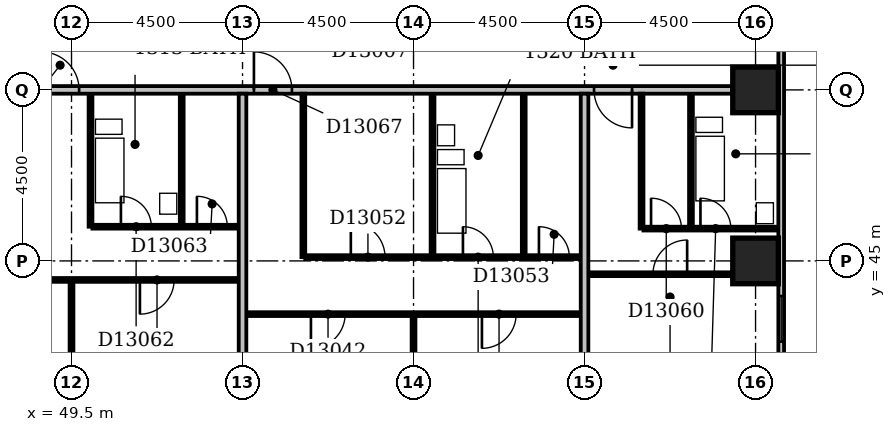
"""IFC4 building model, lengths in metres.
Left out: names, types, materials, properties, quantities, classifications, styles, units other than length and angle.
Written with IfcOpenShell. Run it as: python <this file> out.ifc"""

import sys

from ifc_helpers import new_model, si_unit, direction, frame, frame_2d, origin, origin_2d, place, context, subcontext, project, spatial, rectangle, extrude, element, fill, save


model = new_model("IFC4")
c1 = context("Model", 3, precision=1e-05, world=origin(), true_north=direction((0.0, 1.0)))
c2 = subcontext(c1, "Body", "Model", "MODEL_VIEW")
j1 = project(units=[si_unit("LENGTHUNIT", "METRE"), si_unit("PLANEANGLEUNIT", "RADIAN")], contexts=[c1])
p1 = place(None, origin())
s1 = spatial("IfcSite", under=j1, at=p1, CompositionType="ELEMENT")
p2 = place(p1, origin())
s2 = spatial("IfcBuilding", under=s1, at=p2, CompositionType="ELEMENT")
p3 = place(p2, frame((0.0, 0.0, 57.8)))
s3 = spatial("IfcBuildingStorey", under=s2, at=p3, CompositionType="ELEMENT", Elevation=57.8)
for number, where, z_axis, x_axis in (
    (1, (67.5, 45.0, -0.3), (0.0, 0.0, 1.0), (1.0, 0.0, 0.0)),
    (2, (67.5, 49.5, -0.3), (0.0, 0.0, 1.0), (1.0, 0.0, 0.0)),
):
    element("IfcColumn", number, at=place(p3, frame(where, z_axis=z_axis, x_axis=x_axis)), inside=s3, PredefinedType="COLUMN", context=c2, shape_type="SweptSolid", body=[
        extrude(rectangle(XDim=1.2, YDim=1.2, at=origin_2d()), origin(), (0.0, 0.0, 1.0), 3.6),
    ])
p4 = place(p3, frame((68.175, 35.4, 0.0), z_axis=(0.0, 0.0, 1.0), x_axis=(0.0, 1.0, 0.0)))
e3 = element("IfcWall", 3, at=p4, inside=s3, PredefinedType="STANDARD", context=c2, shape_type="SweptSolid", body=[
    extrude(rectangle(XDim=23.85, YDim=0.15, at=frame_2d((11.925, 0.0))), origin(), (0.0, 0.0, 1.0), 2.7),
])
p5 = place(p4, frame((1.65, 0.0, 0.6)))
e4 = element("IfcOpeningElement", 4, at=p5, cuts=e3, PredefinedType="OPENING", context=c2, shape_type="SweptSolid", body=[
    extrude(rectangle(XDim=2.4, YDim=1.8, at=frame_2d((1.2, 0.9))), frame((0.0, 0.087, 0.0), z_axis=(0.0, -1.0, 0.0), x_axis=(1.0, 0.0, 0.0)), (0.0, 0.0, 1.0), 0.174),
])
p6 = place(p4, frame((7.477, 0.0, 0.6)))
e5 = element("IfcOpeningElement", 5, at=p6, cuts=e3, PredefinedType="OPENING", context=c2, shape_type="SweptSolid", body=[
    extrude(rectangle(XDim=1.2, YDim=1.8, at=frame_2d((0.6, 0.9))), frame((0.0, 0.087, 0.0), z_axis=(0.0, -1.0, 0.0), x_axis=(1.0, 0.0, 0.0)), (0.0, 0.0, 1.0), 0.174),
])
p7 = place(p3, frame((49.5, 36.6, 0.0), z_axis=(0.0, 0.0, 1.0), x_axis=(0.0, 1.0, 0.0)))
e6 = element("IfcWall", 6, at=p7, inside=s3, PredefinedType="PARTITIONING", context=c2, shape_type="SweptSolid", body=[
    extrude(rectangle(XDim=7.85, YDim=0.1, at=frame_2d((3.925, 0.0))), origin(), (0.0, 0.0, 1.0), 3.3),
])
p8 = place(p3, frame((54.0, 36.6, 0.0), z_axis=(0.0, 0.0, 1.0), x_axis=(0.0, 1.0, 0.0)))
e7 = element("IfcWall", 7, at=p8, inside=s3, PredefinedType="PARTITIONING", context=c2, shape_type="SweptSolid", body=[
    extrude(rectangle(XDim=12.8, YDim=0.2, at=frame_2d((6.4, 0.0))), origin(), (0.0, 0.0, 1.0), 2.6),
])
p9 = place(p3, frame((58.5, 36.6, 0.0), z_axis=(0.0, 0.0, 1.0), x_axis=(0.0, 1.0, 0.0)))
e8 = element("IfcWall", 8, at=p9, inside=s3, PredefinedType="PARTITIONING", context=c2, shape_type="SweptSolid", body=[
    extrude(rectangle(XDim=6.95, YDim=0.1, at=frame_2d((3.475, 0.0))), origin(), (0.0, 0.0, 1.0), 3.3),
])
p10 = place(p3, frame((63.0, 36.6, 0.0), z_axis=(0.0, 0.0, 1.0), x_axis=(0.0, 1.0, 0.0)))
e9 = element("IfcWall", 9, at=p10, inside=s3, PredefinedType="PARTITIONING", context=c2, shape_type="SweptSolid", body=[
    extrude(rectangle(XDim=12.8, YDim=0.2, at=frame_2d((6.4, 0.0))), origin(), (0.0, 0.0, 1.0), 2.4),
])
p11 = place(p3, frame((54.1, 43.6, 0.0), z_axis=(0.0, 0.0, 1.0), x_axis=(1.0, 0.0, 0.0)))
e10 = element("IfcWall", 10, at=p11, inside=s3, PredefinedType="PARTITIONING", context=c2, shape_type="SweptSolid", body=[
    extrude(rectangle(XDim=8.8, YDim=0.1, at=frame_2d((4.4, 0.0))), origin(), (0.0, 0.0, 1.0), 3.3),
])
p12 = place(p11, frame((1.7, 0.0, 0.0)))
e11 = element("IfcOpeningElement", 11, at=p12, cuts=e10, PredefinedType="OPENING", context=c2, shape_type="SweptSolid", body=[
    extrude(rectangle(XDim=0.9, YDim=2.1, at=frame_2d((0.45, 1.05))), frame((0.0, 0.062, 0.0), z_axis=(0.0, -1.0, 0.0), x_axis=(1.0, 0.0, 0.0)), (0.0, 0.0, 1.0), 0.124),
])
p13 = place(p11, frame((6.2, 0.0, 0.0)))
e12 = element("IfcOpeningElement", 12, at=p13, cuts=e10, PredefinedType="OPENING", context=c2, shape_type="SweptSolid", body=[
    extrude(rectangle(XDim=0.9, YDim=2.1, at=frame_2d((0.45, 1.05))), frame((0.0, 0.062, 0.0), z_axis=(0.0, -1.0, 0.0), x_axis=(1.0, 0.0, 0.0)), (0.0, 0.0, 1.0), 0.124),
])
p14 = place(p3, frame((40.6, 44.5, 0.0), z_axis=(0.0, 0.0, 1.0), x_axis=(1.0, 0.0, 0.0)))
e13 = element("IfcWall", 13, at=p14, inside=s3, PredefinedType="PARTITIONING", context=c2, shape_type="SweptSolid", body=[
    extrude(rectangle(XDim=13.3, YDim=0.1, at=frame_2d((6.65, 0.0))), origin(), (0.0, 0.0, 1.0), 3.3),
])
p15 = place(p14, frame((1.7, 0.0, 0.0)))
e14 = element("IfcOpeningElement", 14, at=p15, cuts=e13, PredefinedType="OPENING", context=c2, shape_type="SweptSolid", body=[
    extrude(rectangle(XDim=0.9, YDim=2.1, at=frame_2d((0.45, 1.05))), frame((0.0, 0.062, 0.0), z_axis=(0.0, -1.0, 0.0), x_axis=(1.0, 0.0, 0.0)), (0.0, 0.0, 1.0), 0.124),
])
p16 = place(p14, frame((6.2, 0.0, 0.0)))
e15 = element("IfcOpeningElement", 15, at=p16, cuts=e13, PredefinedType="OPENING", context=c2, shape_type="SweptSolid", body=[
    extrude(rectangle(XDim=0.9, YDim=2.1, at=frame_2d((0.45, 1.05))), frame((0.0, 0.062, 0.0), z_axis=(0.0, -1.0, 0.0), x_axis=(1.0, 0.0, 0.0)), (0.0, 0.0, 1.0), 0.124),
])
p17 = place(p14, frame((10.7, 0.0, 0.0)))
e16 = element("IfcOpeningElement", 16, at=p17, cuts=e13, PredefinedType="OPENING", context=c2, shape_type="SweptSolid", body=[
    extrude(rectangle(XDim=0.9, YDim=2.1, at=frame_2d((0.45, 1.05))), frame((0.0, 0.062, 0.0), z_axis=(0.0, -1.0, 0.0), x_axis=(1.0, 0.0, 0.0)), (0.0, 0.0, 1.0), 0.124),
])
p18 = place(p3, frame((63.1, 44.65, 0.0), z_axis=(0.0, 0.0, 1.0), x_axis=(1.0, 0.0, 0.0)))
e17 = element("IfcWall", 17, at=p18, inside=s3, PredefinedType="PARTITIONING", context=c2, shape_type="SweptSolid", body=[
    extrude(rectangle(XDim=3.8, YDim=0.1, at=frame_2d((1.9, 0.0))), origin(), (0.0, 0.0, 1.0), 3.3),
])
p19 = place(p18, frame((1.7, 0.0, 0.0)))
e18 = element("IfcOpeningElement", 18, at=p19, cuts=e17, PredefinedType="OPENING", context=c2, shape_type="SweptSolid", body=[
    extrude(rectangle(XDim=0.9, YDim=2.1, at=frame_2d((0.45, 1.05))), frame((0.0, 0.062, 0.0), z_axis=(0.0, -1.0, 0.0), x_axis=(1.0, 0.0, 0.0)), (0.0, 0.0, 1.0), 0.124),
])
p20 = place(p3, frame((55.6, 45.1, 0.0), z_axis=(0.0, 0.0, 1.0), x_axis=(0.0, 1.0, 0.0)))
e19 = element("IfcWall", 19, at=p20, inside=s3, PredefinedType="PARTITIONING", context=c2, shape_type="SweptSolid", body=[
    extrude(rectangle(XDim=4.3, YDim=0.1, at=frame_2d((2.15, 0.0))), origin(), (0.0, 0.0, 1.0), 3.3),
])
p21 = place(p3, frame((55.65, 45.1, 0.0), z_axis=(0.0, 0.0, 1.0), x_axis=(1.0, 0.0, 0.0)))
e20 = element("IfcWall", 20, at=p21, inside=s3, PredefinedType="PARTITIONING", context=c2, shape_type="SweptSolid", body=[
    extrude(rectangle(XDim=7.25, YDim=0.1, at=frame_2d((3.625, 0.0))), origin(), (0.0, 0.0, 1.0), 3.3),
])
p22 = place(p21, frame((4.15, 0.0, 0.0)))
e21 = element("IfcOpeningElement", 21, at=p22, cuts=e20, PredefinedType="OPENING", context=c2, shape_type="SweptSolid", body=[
    extrude(rectangle(XDim=0.8, YDim=2.1, at=frame_2d((0.4, 1.05))), frame((0.0, 0.062, 0.0), z_axis=(0.0, -1.0, 0.0), x_axis=(1.0, 0.0, 0.0)), (0.0, 0.0, 1.0), 0.124),
])
p23 = place(p21, frame((1.2, 0.0, 0.0)))
e22 = element("IfcOpeningElement", 22, at=p23, cuts=e20, PredefinedType="OPENING", context=c2, shape_type="SweptSolid", body=[
    extrude(rectangle(XDim=0.9, YDim=2.1, at=frame_2d((0.45, 1.05))), frame((0.0, 0.062, 0.0), z_axis=(0.0, -1.0, 0.0), x_axis=(1.0, 0.0, 0.0)), (0.0, 0.0, 1.0), 0.124),
])
p24 = place(p21, frame((6.15, 0.0, 0.0)))
e23 = element("IfcOpeningElement", 23, at=p24, cuts=e20, PredefinedType="OPENING", context=c2, shape_type="SweptSolid", body=[
    extrude(rectangle(XDim=0.8, YDim=2.1, at=frame_2d((0.4, 1.05))), frame((0.0, 0.062, 0.0), z_axis=(0.0, -1.0, 0.0), x_axis=(1.0, 0.0, 0.0)), (0.0, 0.0, 1.0), 0.124),
])
for number, where, z_axis, x_axis in (
    (24, (59.0, 45.15, 0.0), (0.0, 0.0, 1.0), (0.0, 1.0, 0.0)),
    (25, (61.4, 45.15, 0.0), (0.0, 0.0, 1.0), (0.0, 1.0, 0.0)),
):
    element("IfcWall", number, at=place(p3, frame(where, z_axis=z_axis, x_axis=x_axis)), inside=s3, PredefinedType="PLUMBINGWALL", context=c2, shape_type="SweptSolid", body=[
        extrude(rectangle(XDim=4.25, YDim=0.1, at=frame_2d((2.125, 0.0))), origin(), (0.0, 0.0, 1.0), 3.3),
    ])
p25 = place(p3, frame((64.5, 45.85, 0.0), z_axis=(0.0, 0.0, 1.0), x_axis=(0.0, 1.0, 0.0)))
e26 = element("IfcWall", 26, at=p25, inside=s3, PredefinedType="PARTITIONING", context=c2, shape_type="SweptSolid", body=[
    extrude(rectangle(XDim=3.55, YDim=0.1, at=frame_2d((1.775, 0.0))), origin(), (0.0, 0.0, 1.0), 3.3),
])
p26 = place(p3, frame((64.55, 45.85, 0.0), z_axis=(0.0, 0.0, 1.0), x_axis=(1.0, 0.0, 0.0)))
e27 = element("IfcWall", 27, at=p26, inside=s3, PredefinedType="PARTITIONING", context=c2, shape_type="SweptSolid", body=[
    extrude(rectangle(XDim=3.55, YDim=0.1, at=frame_2d((1.775, 0.0))), origin(), (0.0, 0.0, 1.0), 3.3),
])
p27 = place(p26, frame((1.5, 0.0, 0.0)))
e28 = element("IfcOpeningElement", 28, at=p27, cuts=e27, PredefinedType="OPENING", context=c2, shape_type="SweptSolid", body=[
    extrude(rectangle(XDim=0.8, YDim=2.1, at=frame_2d((0.4, 1.05))), frame((0.0, 0.062, 0.0), z_axis=(0.0, -1.0, 0.0), x_axis=(1.0, 0.0, 0.0)), (0.0, 0.0, 1.0), 0.124),
])
p28 = place(p26, frame((0.2, 0.0, 0.0)))
e29 = element("IfcOpeningElement", 29, at=p28, cuts=e27, PredefinedType="OPENING", context=c2, shape_type="SweptSolid", body=[
    extrude(rectangle(XDim=0.8, YDim=2.1, at=frame_2d((0.4, 1.05))), frame((0.0, 0.062, 0.0), z_axis=(0.0, -1.0, 0.0), x_axis=(1.0, 0.0, 0.0)), (0.0, 0.0, 1.0), 0.124),
])
p29 = place(p3, frame((50.0, 45.9, 0.0), z_axis=(0.0, 0.0, 1.0), x_axis=(0.0, 1.0, 0.0)))
e30 = element("IfcWall", 30, at=p29, inside=s3, PredefinedType="PLUMBINGWALL", context=c2, shape_type="SweptSolid", body=[
    extrude(rectangle(XDim=3.5, YDim=0.1, at=frame_2d((1.75, 0.0))), origin(), (0.0, 0.0, 1.0), 3.3),
])
p30 = place(p3, frame((50.05, 45.9, 0.0), z_axis=(0.0, 0.0, 1.0), x_axis=(1.0, 0.0, 0.0)))
e31 = element("IfcWall", 31, at=p30, inside=s3, PredefinedType="PARTITIONING", context=c2, shape_type="SweptSolid", body=[
    extrude(rectangle(XDim=3.85, YDim=0.1, at=frame_2d((1.925, 0.0))), origin(), (0.0, 0.0, 1.0), 3.3),
])
p31 = place(p30, frame((0.75, 0.0, 0.0)))
e32 = element("IfcOpeningElement", 32, at=p31, cuts=e31, PredefinedType="OPENING", context=c2, shape_type="SweptSolid", body=[
    extrude(rectangle(XDim=0.8, YDim=2.1, at=frame_2d((0.4, 1.05))), frame((0.0, 0.062, 0.0), z_axis=(0.0, -1.0, 0.0), x_axis=(1.0, 0.0, 0.0)), (0.0, 0.0, 1.0), 0.124),
])
p32 = place(p30, frame((2.75, 0.0, 0.0)))
e33 = element("IfcOpeningElement", 33, at=p32, cuts=e31, PredefinedType="OPENING", context=c2, shape_type="SweptSolid", body=[
    extrude(rectangle(XDim=0.8, YDim=2.1, at=frame_2d((0.4, 1.05))), frame((0.0, 0.062, 0.0), z_axis=(0.0, -1.0, 0.0), x_axis=(1.0, 0.0, 0.0)), (0.0, 0.0, 1.0), 0.124),
])
p33 = place(p3, frame((65.8, 45.9, 0.0), z_axis=(0.0, 0.0, 1.0), x_axis=(0.0, 1.0, 0.0)))
e34 = element("IfcWall", 34, at=p33, inside=s3, PredefinedType="PLUMBINGWALL", context=c2, shape_type="SweptSolid", body=[
    extrude(rectangle(XDim=3.5, YDim=0.1, at=frame_2d((1.75, 0.0))), origin(), (0.0, 0.0, 1.0), 3.3),
])
p34 = place(p3, frame((52.4, 45.95, 0.0), z_axis=(0.0, 0.0, 1.0), x_axis=(0.0, 1.0, 0.0)))
e35 = element("IfcWall", 35, at=p34, inside=s3, PredefinedType="PLUMBINGWALL", context=c2, shape_type="SweptSolid", body=[
    extrude(rectangle(XDim=3.45, YDim=0.1, at=frame_2d((1.725, 0.0))), origin(), (0.0, 0.0, 1.0), 3.3),
])
p35 = place(p3, frame((9.1, 49.5, 0.0), z_axis=(0.0, 0.0, 1.0), x_axis=(1.0, 0.0, 0.0)))
e36 = element("IfcWall", 36, at=p35, inside=s3, PredefinedType="PARTITIONING", context=c2, shape_type="SweptSolid", body=[
    extrude(rectangle(XDim=57.8, YDim=0.2, at=frame_2d((28.9, 0.0))), origin(), (0.0, 0.0, 1.0), 3.3),
])
p36 = place(p35, frame((15.35, 0.0, 0.0)))
e37 = element("IfcOpeningElement", 37, at=p36, cuts=e36, PredefinedType="OPENING", context=c2, shape_type="SweptSolid", body=[
    extrude(rectangle(XDim=1.0, YDim=2.1, at=frame_2d((0.5, 1.05))), frame((0.0, 0.112, 0.0), z_axis=(0.0, -1.0, 0.0), x_axis=(1.0, 0.0, 0.0)), (0.0, 0.0, 1.0), 0.224),
])
p37 = place(p35, frame((18.2, 0.0, 0.0)))
e38 = element("IfcOpeningElement", 38, at=p37, cuts=e36, PredefinedType="OPENING", context=c2, shape_type="SweptSolid", body=[
    extrude(rectangle(XDim=1.0, YDim=2.1, at=frame_2d((0.5, 1.05))), frame((0.0, 0.112, 0.0), z_axis=(0.0, -1.0, 0.0), x_axis=(1.0, 0.0, 0.0)), (0.0, 0.0, 1.0), 0.224),
])
p38 = place(p35, frame((39.6, 0.0, 0.0)))
e39 = element("IfcOpeningElement", 39, at=p38, cuts=e36, PredefinedType="OPENING", context=c2, shape_type="SweptSolid", body=[
    extrude(rectangle(XDim=1.0, YDim=2.1, at=frame_2d((0.5, 1.05))), frame((0.0, 0.112, 0.0), z_axis=(0.0, -1.0, 0.0), x_axis=(1.0, 0.0, 0.0)), (0.0, 0.0, 1.0), 0.224),
])
p39 = place(p35, frame((45.2, 0.0, 0.0)))
e40 = element("IfcOpeningElement", 40, at=p39, cuts=e36, PredefinedType="OPENING", context=c2, shape_type="SweptSolid", body=[
    extrude(rectangle(XDim=1.0, YDim=2.1, at=frame_2d((0.5, 1.05))), frame((0.0, 0.112, 0.0), z_axis=(0.0, -1.0, 0.0), x_axis=(1.0, 0.0, 0.0)), (0.0, 0.0, 1.0), 0.224),
])
p40 = place(p35, frame((54.15, 0.0, 0.0)))
e41 = element("IfcOpeningElement", 41, at=p40, cuts=e36, PredefinedType="OPENING", context=c2, shape_type="SweptSolid", body=[
    extrude(rectangle(XDim=1.0, YDim=2.1, at=frame_2d((0.5, 1.05))), frame((0.0, 0.112, 0.0), z_axis=(0.0, -1.0, 0.0), x_axis=(1.0, 0.0, 0.0)), (0.0, 0.0, 1.0), 0.224),
])
p41 = place(p35, frame((6.15, 0.0, 0.0)))
e42 = element("IfcOpeningElement", 42, at=p41, cuts=e36, PredefinedType="OPENING", context=c2, shape_type="SweptSolid", body=[
    extrude(rectangle(XDim=0.9, YDim=2.1, at=frame_2d((0.45, 1.05))), frame((0.0, 0.112, 0.0), z_axis=(0.0, -1.0, 0.0), x_axis=(1.0, 0.0, 0.0)), (0.0, 0.0, 1.0), 0.224),
])
p42 = place(p6, origin())
e43 = element("IfcWindow", 43, at=p42, inside=s3, PartitioningType="SINGLE_PANEL", PredefinedType="WINDOW", context=c2, shape_type="SweptSolid", body=[
    extrude(rectangle(XDim=1.2, YDim=1.8, at=frame_2d((0.6, 0.9))), frame((0.0, 0.03, 0.0), z_axis=(0.0, -1.0, 0.0), x_axis=(1.0, 0.0, 0.0)), (0.0, 0.0, 1.0), 0.06),
])
fill(e5, e43)
p43 = place(p12, frame((0.9, 0.0, 0.0), z_axis=(0.0, 0.0, 1.0), x_axis=(-1.0, 0.0, 0.0)))
e44 = element("IfcDoor", 44, at=p43, inside=s3, OperationType="SINGLE_SWING_RIGHT", PredefinedType="DOOR", context=c2, shape_type="SweptSolid", body=[
    extrude(rectangle(XDim=0.9, YDim=2.1, at=frame_2d((0.45, 1.05))), frame((0.0, 0.025, 0.0), z_axis=(0.0, -1.0, 0.0), x_axis=(1.0, 0.0, 0.0)), (0.0, 0.0, 1.0), 0.05),
])
fill(e11, e44)
p44 = place(p13, frame((0.9, 0.0, 0.0), z_axis=(0.0, 0.0, 1.0), x_axis=(-1.0, 0.0, 0.0)))
e45 = element("IfcDoor", 45, at=p44, inside=s3, OperationType="SINGLE_SWING_RIGHT", PredefinedType="DOOR", context=c2, shape_type="SweptSolid", body=[
    extrude(rectangle(XDim=0.9, YDim=2.1, at=frame_2d((0.45, 1.05))), frame((0.0, 0.025, 0.0), z_axis=(0.0, -1.0, 0.0), x_axis=(1.0, 0.0, 0.0)), (0.0, 0.0, 1.0), 0.05),
])
fill(e12, e45)
p45 = place(p17, frame((0.9, 0.0, 0.0), z_axis=(0.0, 0.0, 1.0), x_axis=(-1.0, 0.0, 0.0)))
e46 = element("IfcDoor", 46, at=p45, inside=s3, OperationType="SINGLE_SWING_RIGHT", PredefinedType="DOOR", context=c2, shape_type="SweptSolid", body=[
    extrude(rectangle(XDim=0.9, YDim=2.1, at=frame_2d((0.45, 1.05))), frame((0.0, 0.025, 0.0), z_axis=(0.0, -1.0, 0.0), x_axis=(1.0, 0.0, 0.0)), (0.0, 0.0, 1.0), 0.05),
])
fill(e16, e46)
p46 = place(p19, frame((0.9, 0.0, 0.0), z_axis=(0.0, 0.0, 1.0), x_axis=(-1.0, 0.0, 0.0)))
e47 = element("IfcDoor", 47, at=p46, inside=s3, OperationType="SINGLE_SWING_LEFT", PredefinedType="DOOR", context=c2, shape_type="SweptSolid", body=[
    extrude(rectangle(XDim=0.9, YDim=2.1, at=frame_2d((0.45, 1.05))), frame((0.0, 0.025, 0.0), z_axis=(0.0, -1.0, 0.0), x_axis=(1.0, 0.0, 0.0)), (0.0, 0.0, 1.0), 0.05),
])
fill(e18, e47)
p47 = place(p22, origin())
e48 = element("IfcDoor", 48, at=p47, inside=s3, OperationType="SINGLE_SWING_LEFT", PredefinedType="DOOR", context=c2, shape_type="SweptSolid", body=[
    extrude(rectangle(XDim=0.8, YDim=2.1, at=frame_2d((0.4, 1.05))), frame((0.0, 0.025, 0.0), z_axis=(0.0, -1.0, 0.0), x_axis=(1.0, 0.0, 0.0)), (0.0, 0.0, 1.0), 0.05),
])
fill(e21, e48)
p48 = place(p23, origin())
e49 = element("IfcDoor", 49, at=p48, inside=s3, OperationType="SINGLE_SWING_LEFT", PredefinedType="DOOR", context=c2, shape_type="SweptSolid", body=[
    extrude(rectangle(XDim=0.9, YDim=2.1, at=frame_2d((0.45, 1.05))), frame((0.0, 0.025, 0.0), z_axis=(0.0, -1.0, 0.0), x_axis=(1.0, 0.0, 0.0)), (0.0, 0.0, 1.0), 0.05),
])
fill(e22, e49)
p49 = place(p24, origin())
e50 = element("IfcDoor", 50, at=p49, inside=s3, OperationType="SINGLE_SWING_LEFT", PredefinedType="DOOR", context=c2, shape_type="SweptSolid", body=[
    extrude(rectangle(XDim=0.8, YDim=2.1, at=frame_2d((0.4, 1.05))), frame((0.0, 0.025, 0.0), z_axis=(0.0, -1.0, 0.0), x_axis=(1.0, 0.0, 0.0)), (0.0, 0.0, 1.0), 0.05),
])
fill(e23, e50)
p50 = place(p27, origin())
e51 = element("IfcDoor", 51, at=p50, inside=s3, OperationType="SINGLE_SWING_LEFT", PredefinedType="DOOR", context=c2, shape_type="SweptSolid", body=[
    extrude(rectangle(XDim=0.8, YDim=2.1, at=frame_2d((0.4, 1.05))), frame((0.0, 0.025, 0.0), z_axis=(0.0, -1.0, 0.0), x_axis=(1.0, 0.0, 0.0)), (0.0, 0.0, 1.0), 0.05),
])
fill(e28, e51)
p51 = place(p28, origin())
e52 = element("IfcDoor", 52, at=p51, inside=s3, OperationType="SINGLE_SWING_LEFT", PredefinedType="DOOR", context=c2, shape_type="SweptSolid", body=[
    extrude(rectangle(XDim=0.8, YDim=2.1, at=frame_2d((0.4, 1.05))), frame((0.0, 0.025, 0.0), z_axis=(0.0, -1.0, 0.0), x_axis=(1.0, 0.0, 0.0)), (0.0, 0.0, 1.0), 0.05),
])
fill(e29, e52)
p52 = place(p31, origin())
e53 = element("IfcDoor", 53, at=p52, inside=s3, OperationType="SINGLE_SWING_LEFT", PredefinedType="DOOR", context=c2, shape_type="SweptSolid", body=[
    extrude(rectangle(XDim=0.8, YDim=2.1, at=frame_2d((0.4, 1.05))), frame((0.0, 0.025, 0.0), z_axis=(0.0, -1.0, 0.0), x_axis=(1.0, 0.0, 0.0)), (0.0, 0.0, 1.0), 0.05),
])
fill(e32, e53)
p53 = place(p32, origin())
e54 = element("IfcDoor", 54, at=p53, inside=s3, OperationType="SINGLE_SWING_LEFT", PredefinedType="DOOR", context=c2, shape_type="SweptSolid", body=[
    extrude(rectangle(XDim=0.8, YDim=2.1, at=frame_2d((0.4, 1.05))), frame((0.0, 0.025, 0.0), z_axis=(0.0, -1.0, 0.0), x_axis=(1.0, 0.0, 0.0)), (0.0, 0.0, 1.0), 0.05),
])
fill(e33, e54)
p54 = place(p38, origin())
e55 = element("IfcDoor", 55, at=p54, inside=s3, OperationType="SINGLE_SWING_LEFT", PredefinedType="DOOR", context=c2, shape_type="SweptSolid", body=[
    extrude(rectangle(XDim=1.0, YDim=2.1, at=frame_2d((0.5, 1.05))), frame((0.0, 0.025, 0.0), z_axis=(0.0, -1.0, 0.0), x_axis=(1.0, 0.0, 0.0)), (0.0, 0.0, 1.0), 0.05),
])
fill(e39, e55)
p55 = place(p39, origin())
e56 = element("IfcDoor", 56, at=p55, inside=s3, OperationType="SINGLE_SWING_LEFT", PredefinedType="DOOR", context=c2, shape_type="SweptSolid", body=[
    extrude(rectangle(XDim=1.0, YDim=2.1, at=frame_2d((0.5, 1.05))), frame((0.0, 0.025, 0.0), z_axis=(0.0, -1.0, 0.0), x_axis=(1.0, 0.0, 0.0)), (0.0, 0.0, 1.0), 0.05),
])
fill(e40, e56)
p56 = place(p40, origin())
e57 = element("IfcDoor", 57, at=p56, inside=s3, OperationType="SINGLE_SWING_RIGHT", PredefinedType="DOOR", context=c2, shape_type="SweptSolid", body=[
    extrude(rectangle(XDim=1.0, YDim=2.1, at=frame_2d((0.5, 1.05))), frame((0.0, 0.025, 0.0), z_axis=(0.0, -1.0, 0.0), x_axis=(1.0, 0.0, 0.0)), (0.0, 0.0, 1.0), 0.05),
])
fill(e41, e57)
save(model, sys.argv[1])
